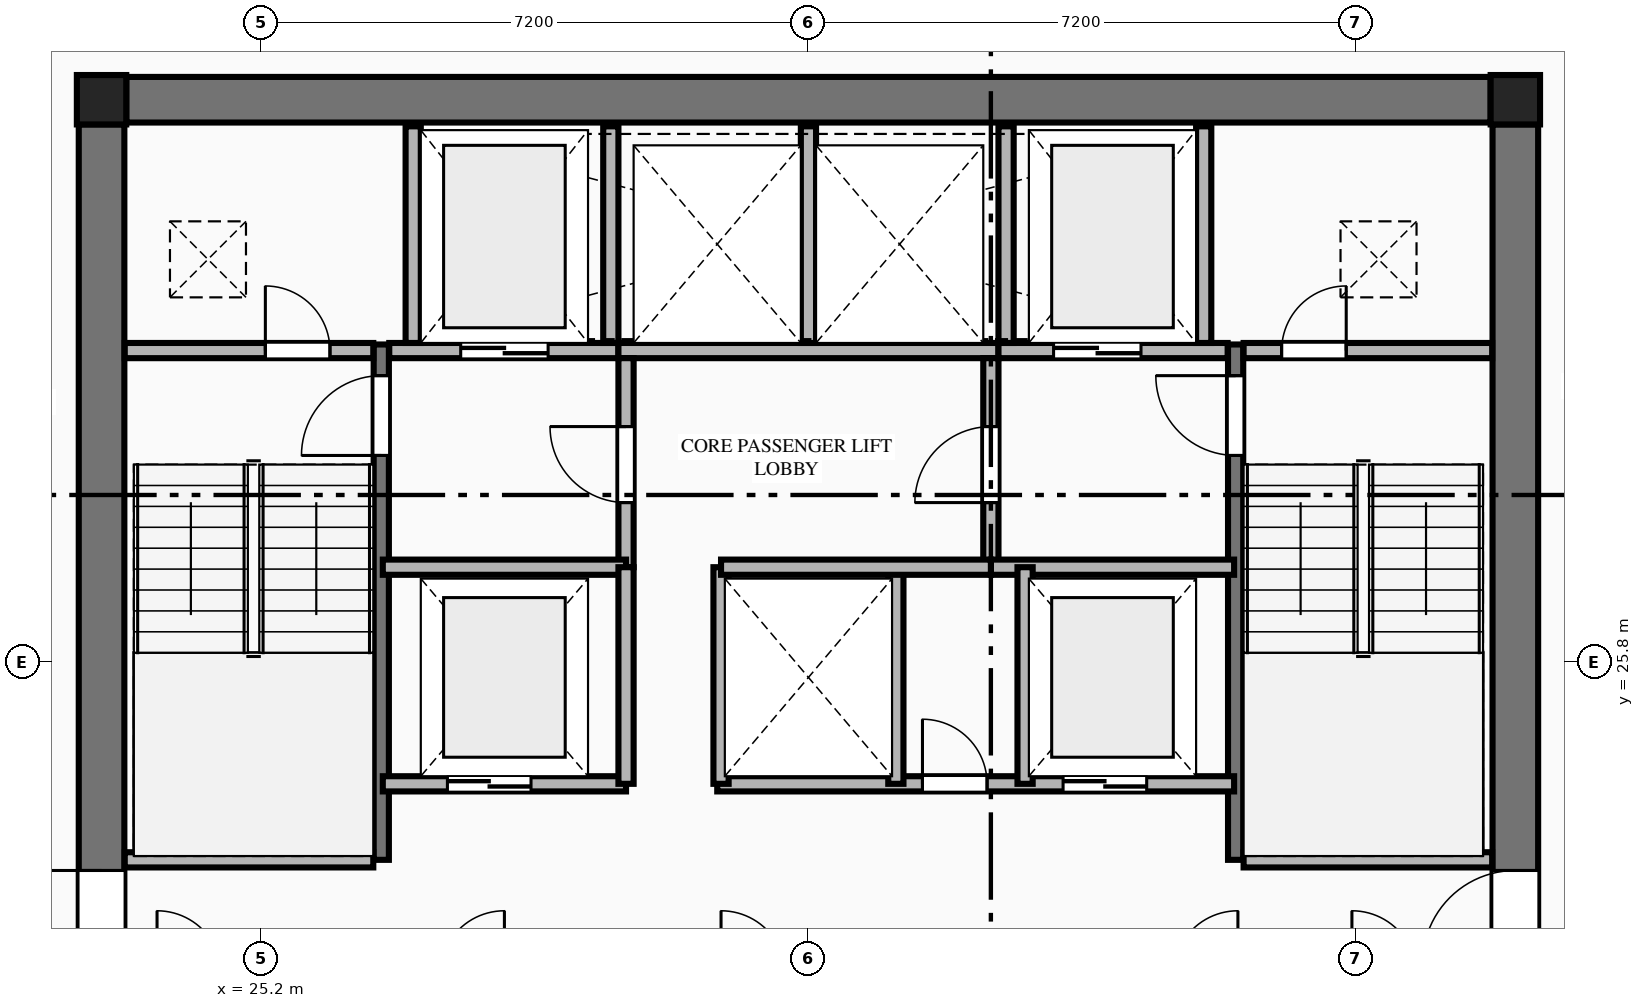
"""IFC4 building model, lengths in metres.
Left out: names, types, materials, properties, quantities, classifications, styles, units other than length and angle.
Written with IfcOpenShell. Run it as: python <this file> out.ifc"""

import sys

from ifc_helpers import new_model, si_unit, direction, frame, frame_2d, origin, origin_2d, place, context, subcontext, project, spatial, rectangle, extrude, element, fill, save


model = new_model("IFC4")
c1 = context("Model", 3, precision=1e-05, world=origin(), true_north=direction((0.0, 1.0)))
c2 = subcontext(c1, "Body", "Model", "MODEL_VIEW")
j1 = project(units=[si_unit("LENGTHUNIT", "METRE"), si_unit("PLANEANGLEUNIT", "RADIAN")], contexts=[c1])
p1 = place(None, origin())
s1 = spatial("IfcSite", under=j1, at=p1, CompositionType="ELEMENT")
p2 = place(p1, origin())
s2 = spatial("IfcBuilding", under=s1, at=p2, CompositionType="ELEMENT")
p3 = place(p2, frame((0.0, 0.0, 153.5)))
s3 = spatial("IfcBuildingStorey", under=s2, at=p3, CompositionType="ELEMENT", Elevation=153.5)
for number, where, z_axis, x_axis in (
    (1, (41.7, 33.2, 0.0), (0.0, 0.0, 1.0), (1.0, 0.0, 0.0)),
    (2, (23.1, 33.2, 0.0), (0.0, 0.0, 1.0), (1.0, 0.0, 0.0)),
):
    element("IfcColumn", number, at=place(p3, frame(where, z_axis=z_axis, x_axis=x_axis)), inside=s3, PredefinedType="COLUMN", context=c2, shape_type="SweptSolid", body=[
        extrude(rectangle(XDim=0.65, YDim=0.65, at=origin_2d()), origin(), (0.0, 0.0, 1.0), 3.55),
    ])
p4 = place(p3, frame((23.425, 33.2, 0.0), z_axis=(0.0, 0.0, 1.0), x_axis=(1.0, 0.0, 0.0)))
e3 = element("IfcWall", 3, at=p4, inside=s3, PredefinedType="SHEAR", context=c2, shape_type="SweptSolid", body=[
    extrude(rectangle(XDim=17.95, YDim=0.6, at=frame_2d((8.975, 0.0))), origin(), (0.0, 0.0, 1.0), 3.34),
])
p5 = place(p3, frame((23.1, 18.925, 0.0), z_axis=(0.0, 0.0, 1.0), x_axis=(0.0, 1.0, 0.0)))
e4 = element("IfcWall", 4, at=p5, inside=s3, PredefinedType="SHEAR", context=c2, shape_type="SweptSolid", body=[
    extrude(rectangle(XDim=13.95, YDim=0.6, at=frame_2d((6.975, 0.0))), origin(), (0.0, 0.0, 1.0), 3.34),
])
p6 = place(p5, frame((2.915, 0.0, 0.0)))
e5 = element("IfcOpeningElement", 5, at=p6, cuts=e4, PredefinedType="OPENING", context=c2, shape_type="SweptSolid", body=[
    extrude(rectangle(XDim=1.22, YDim=2.25, at=frame_2d((0.61, 1.125))), frame((0.0, 0.31, 0.0), z_axis=(0.0, -1.0, 0.0), x_axis=(1.0, 0.0, 0.0)), (0.0, 0.0, 1.0), 0.62),
])
p7 = place(p3, frame((41.7, 18.925, 0.0), z_axis=(0.0, 0.0, 1.0), x_axis=(0.0, 1.0, 0.0)))
e6 = element("IfcWall", 6, at=p7, inside=s3, PredefinedType="SHEAR", context=c2, shape_type="SweptSolid", body=[
    extrude(rectangle(XDim=13.95, YDim=0.6, at=frame_2d((6.975, 0.0))), origin(), (0.0, 0.0, 1.0), 3.34),
])
p8 = place(p7, frame((2.915, 0.0, 0.0)))
e7 = element("IfcOpeningElement", 7, at=p8, cuts=e6, PredefinedType="OPENING", context=c2, shape_type="SweptSolid", body=[
    extrude(rectangle(XDim=1.22, YDim=2.25, at=frame_2d((0.61, 1.125))), frame((0.0, 0.31, 0.0), z_axis=(0.0, -1.0, 0.0), x_axis=(1.0, 0.0, 0.0)), (0.0, 0.0, 1.0), 0.62),
])
p9 = place(p3, frame((26.78, 23.2, 0.0), z_axis=(0.0, 0.0, 1.0), x_axis=(0.0, 1.0, 0.0)))
e8 = element("IfcWall", 8, at=p9, inside=s3, PredefinedType="SHEAR", context=c2, shape_type="SweptSolid", body=[
    extrude(rectangle(XDim=6.78, YDim=0.2, at=frame_2d((3.39, 0.0))), origin(), (0.0, 0.0, 1.0), 3.55),
])
p10 = place(p9, frame((5.32, 0.0, 0.0)))
e9 = element("IfcOpeningElement", 9, at=p10, cuts=e8, PredefinedType="OPENING", context=c2, shape_type="SweptSolid", body=[
    extrude(rectangle(XDim=1.05, YDim=2.15, at=frame_2d((0.525, 1.075))), frame((0.0, 0.11, 0.0), z_axis=(0.0, -1.0, 0.0), x_axis=(1.0, 0.0, 0.0)), (0.0, 0.0, 1.0), 0.22),
])
p11 = place(p3, frame((23.405, 23.2, 0.0), z_axis=(0.0, 0.0, 1.0), x_axis=(1.0, 0.0, 0.0)))
e10 = element("IfcWall", 10, at=p11, inside=s3, PredefinedType="PLUMBINGWALL", context=c2, shape_type="SweptSolid", body=[
    extrude(rectangle(XDim=3.27, YDim=0.2, at=frame_2d((1.635, 0.0))), origin(), (0.0, 0.0, 1.0), 3.34),
])
p12 = place(p3, frame((38.02, 23.2, 0.0), z_axis=(0.0, 0.0, 1.0), x_axis=(0.0, 1.0, 0.0)))
e11 = element("IfcWall", 11, at=p12, inside=s3, PredefinedType="SHEAR", context=c2, shape_type="SweptSolid", body=[
    extrude(rectangle(XDim=6.78, YDim=0.2, at=frame_2d((3.39, 0.0))), origin(), (0.0, 0.0, 1.0), 3.55),
])
p13 = place(p12, frame((5.32, 0.0, 0.0)))
e12 = element("IfcOpeningElement", 12, at=p13, cuts=e11, PredefinedType="OPENING", context=c2, shape_type="SweptSolid", body=[
    extrude(rectangle(XDim=1.05, YDim=2.15, at=frame_2d((0.525, 1.075))), frame((0.0, 0.11, 0.0), z_axis=(0.0, -1.0, 0.0), x_axis=(1.0, 0.0, 0.0)), (0.0, 0.0, 1.0), 0.22),
])
p14 = place(p3, frame((38.125, 23.2, 0.0), z_axis=(0.0, 0.0, 1.0), x_axis=(1.0, 0.0, 0.0)))
e13 = element("IfcWall", 13, at=p14, inside=s3, PredefinedType="PLUMBINGWALL", context=c2, shape_type="SweptSolid", body=[
    extrude(rectangle(XDim=3.27, YDim=0.2, at=frame_2d((1.635, 0.0))), origin(), (0.0, 0.0, 1.0), 3.34),
])
p15 = place(p3, frame((23.405, 29.9, 0.0), z_axis=(0.0, 0.0, 1.0), x_axis=(1.0, 0.0, 0.0)))
e14 = element("IfcWall", 14, at=p15, inside=s3, PredefinedType="PLUMBINGWALL", context=c2, shape_type="SweptSolid", body=[
    extrude(rectangle(XDim=3.27, YDim=0.2, at=frame_2d((1.635, 0.0))), origin(), (0.0, 0.0, 1.0), 3.34),
])
p16 = place(p15, frame((1.85, 0.0, 0.0)))
e15 = element("IfcOpeningElement", 15, at=p16, cuts=e14, PredefinedType="OPENING", context=c2, shape_type="SweptSolid", body=[
    extrude(rectangle(XDim=0.85, YDim=2.05, at=frame_2d((0.425, 1.025))), frame((0.0, 0.11, 0.0), z_axis=(0.0, -1.0, 0.0), x_axis=(1.0, 0.0, 0.0)), (0.0, 0.0, 1.0), 0.22),
])
p17 = place(p3, frame((26.885, 29.9, 0.0), z_axis=(0.0, 0.0, 1.0), x_axis=(1.0, 0.0, 0.0)))
e16 = element("IfcWall", 16, at=p17, inside=s3, PredefinedType="PLUMBINGWALL", context=c2, shape_type="SweptSolid", body=[
    extrude(rectangle(XDim=3.015, YDim=0.2, at=frame_2d((1.507, 0.0))), origin(), (0.0, 0.0, 1.0), 3.34),
])
p18 = place(p17, frame((0.94, 0.0, 0.0)))
e17 = element("IfcOpeningElement", 17, at=p18, cuts=e16, PredefinedType="OPENING", context=c2, shape_type="SweptSolid", body=[
    extrude(rectangle(XDim=1.15, YDim=2.2, at=frame_2d((0.575, 1.1))), frame((0.0, 0.11, 0.0), z_axis=(0.0, -1.0, 0.0), x_axis=(1.0, 0.0, 0.0)), (0.0, 0.0, 1.0), 0.22),
])
p19 = place(p3, frame((29.9, 29.9, 0.0), z_axis=(0.0, 0.0, 1.0), x_axis=(1.0, 0.0, 0.0)))
e18 = element("IfcWall", 18, at=p19, inside=s3, PredefinedType="PLUMBINGWALL", context=c2, shape_type="SweptSolid", body=[
    extrude(rectangle(XDim=5.0, YDim=0.2, at=frame_2d((2.5, 0.0))), origin(), (0.0, 0.0, 1.0), 3.34),
])
p20 = place(p3, frame((34.9, 29.9, 0.0), z_axis=(0.0, 0.0, 1.0), x_axis=(1.0, 0.0, 0.0)))
e19 = element("IfcWall", 19, at=p20, inside=s3, PredefinedType="PLUMBINGWALL", context=c2, shape_type="SweptSolid", body=[
    extrude(rectangle(XDim=3.015, YDim=0.2, at=frame_2d((1.508, 0.0))), origin(), (0.0, 0.0, 1.0), 3.34),
])
p21 = place(p20, frame((0.725, 0.0, 0.0)))
e20 = element("IfcOpeningElement", 20, at=p21, cuts=e19, PredefinedType="OPENING", context=c2, shape_type="SweptSolid", body=[
    extrude(rectangle(XDim=1.15, YDim=2.2, at=frame_2d((0.575, 1.1))), frame((0.0, 0.11, 0.0), z_axis=(0.0, -1.0, 0.0), x_axis=(1.0, 0.0, 0.0)), (0.0, 0.0, 1.0), 0.22),
])
p22 = place(p3, frame((38.125, 29.9, 0.0), z_axis=(0.0, 0.0, 1.0), x_axis=(1.0, 0.0, 0.0)))
e21 = element("IfcWall", 21, at=p22, inside=s3, PredefinedType="PLUMBINGWALL", context=c2, shape_type="SweptSolid", body=[
    extrude(rectangle(XDim=3.27, YDim=0.2, at=frame_2d((1.635, 0.0))), origin(), (0.0, 0.0, 1.0), 3.34),
])
p23 = place(p22, frame((0.5, 0.0, 0.0)))
e22 = element("IfcOpeningElement", 22, at=p23, cuts=e21, PredefinedType="OPENING", context=c2, shape_type="SweptSolid", body=[
    extrude(rectangle(XDim=0.85, YDim=2.05, at=frame_2d((0.425, 1.025))), frame((0.0, 0.11, 0.0), z_axis=(0.0, -1.0, 0.0), x_axis=(1.0, 0.0, 0.0)), (0.0, 0.0, 1.0), 0.22),
])
for number, where, z_axis, x_axis in (
    (23, (27.2, 30.0, 0.0), (0.0, 0.0, 1.0), (0.0, 1.0, 0.0)),
    (24, (29.8, 30.0, 0.0), (0.0, 0.0, 1.0), (0.0, 1.0, 0.0)),
    (25, (32.4, 30.0, 0.0), (0.0, 0.0, 1.0), (0.0, 1.0, 0.0)),
    (26, (35.0, 30.0, 0.0), (0.0, 0.0, 1.0), (0.0, 1.0, 0.0)),
    (27, (37.6, 30.0, 0.0), (0.0, 0.0, 1.0), (0.0, 1.0, 0.0)),
):
    element("IfcWall", number, at=place(p3, frame(where, z_axis=z_axis, x_axis=x_axis)), inside=s3, PredefinedType="PLUMBINGWALL", context=c2, shape_type="SweptSolid", body=[
        extrude(rectangle(XDim=2.85, YDim=0.2, at=frame_2d((1.425, 0.0))), origin(), (0.0, 0.0, 1.0), 3.34),
    ])
p24 = place(p3, frame((30.0, 27.05, 0.0), z_axis=(0.0, 0.0, 1.0), x_axis=(0.0, 1.0, 0.0)))
e28 = element("IfcWall", 28, at=p24, inside=s3, PredefinedType="PLUMBINGWALL", context=c2, shape_type="SweptSolid", body=[
    extrude(rectangle(XDim=2.75, YDim=0.2, at=frame_2d((1.375, 0.0))), origin(), (0.0, 0.0, 1.0), 3.34),
])
p25 = place(p24, frame((0.85, 0.0, 0.0)))
e29 = element("IfcOpeningElement", 29, at=p25, cuts=e28, PredefinedType="OPENING", context=c2, shape_type="SweptSolid", body=[
    extrude(rectangle(XDim=1.0, YDim=2.15, at=frame_2d((0.5, 1.075))), frame((0.0, 0.11, 0.0), z_axis=(0.0, -1.0, 0.0), x_axis=(1.0, 0.0, 0.0)), (0.0, 0.0, 1.0), 0.22),
])
p26 = place(p3, frame((26.8, 27.05, 0.0), z_axis=(0.0, 0.0, 1.0), x_axis=(1.0, 0.0, 0.0)))
e30 = element("IfcWall", 30, at=p26, inside=s3, PredefinedType="PLUMBINGWALL", context=c2, shape_type="SweptSolid", body=[
    extrude(rectangle(XDim=3.2, YDim=0.2, at=frame_2d((1.6, 0.0))), origin(), (0.0, 0.0, 1.0), 3.34),
])
p27 = place(p3, frame((34.8, 27.05, 0.0), z_axis=(0.0, 0.0, 1.0), x_axis=(0.0, 1.0, 0.0)))
e31 = element("IfcWall", 31, at=p27, inside=s3, PredefinedType="PLUMBINGWALL", context=c2, shape_type="SweptSolid", body=[
    extrude(rectangle(XDim=2.75, YDim=0.2, at=frame_2d((1.375, 0.0))), origin(), (0.0, 0.0, 1.0), 3.34),
])
p28 = place(p27, frame((0.85, 0.0, 0.0)))
e32 = element("IfcOpeningElement", 32, at=p28, cuts=e31, PredefinedType="OPENING", context=c2, shape_type="SweptSolid", body=[
    extrude(rectangle(XDim=1.0, YDim=2.15, at=frame_2d((0.5, 1.075))), frame((0.0, 0.11, 0.0), z_axis=(0.0, -1.0, 0.0), x_axis=(1.0, 0.0, 0.0)), (0.0, 0.0, 1.0), 0.22),
])
p29 = place(p3, frame((34.8, 27.05, 0.0), z_axis=(0.0, 0.0, 1.0), x_axis=(1.0, 0.0, 0.0)))
e33 = element("IfcWall", 33, at=p29, inside=s3, PredefinedType="PLUMBINGWALL", context=c2, shape_type="SweptSolid", body=[
    extrude(rectangle(XDim=3.2, YDim=0.2, at=frame_2d((1.6, 0.0))), origin(), (0.0, 0.0, 1.0), 3.34),
])
p30 = place(p3, frame((26.8, 24.2, 0.0), z_axis=(0.0, 0.0, 1.0), x_axis=(1.0, 0.0, 0.0)))
e34 = element("IfcWall", 34, at=p30, inside=s3, PredefinedType="PLUMBINGWALL", context=c2, shape_type="SweptSolid", body=[
    extrude(rectangle(XDim=3.2, YDim=0.2, at=frame_2d((1.6, 0.0))), origin(), (0.0, 0.0, 1.0), 3.34),
])
p31 = place(p30, frame((0.85, 0.0, 0.0)))
e35 = element("IfcOpeningElement", 35, at=p31, cuts=e34, PredefinedType="OPENING", context=c2, shape_type="SweptSolid", body=[
    extrude(rectangle(XDim=1.1, YDim=2.2, at=frame_2d((0.55, 1.1))), frame((0.0, 0.11, 0.0), z_axis=(0.0, -1.0, 0.0), x_axis=(1.0, 0.0, 0.0)), (0.0, 0.0, 1.0), 0.22),
])
p32 = place(p3, frame((30.0, 24.2, 0.0), z_axis=(0.0, 0.0, 1.0), x_axis=(0.0, 1.0, 0.0)))
e36 = element("IfcWall", 36, at=p32, inside=s3, PredefinedType="PLUMBINGWALL", context=c2, shape_type="SweptSolid", body=[
    extrude(rectangle(XDim=2.85, YDim=0.2, at=frame_2d((1.425, 0.0))), origin(), (0.0, 0.0, 1.0), 3.34),
])
p33 = place(p3, frame((31.2, 24.2, 0.0), z_axis=(0.0, 0.0, 1.0), x_axis=(1.0, 0.0, 0.0)))
e37 = element("IfcWall", 37, at=p33, inside=s3, PredefinedType="PLUMBINGWALL", context=c2, shape_type="SweptSolid", body=[
    extrude(rectangle(XDim=6.8, YDim=0.2, at=frame_2d((3.4, 0.0))), origin(), (0.0, 0.0, 1.0), 3.34),
])
p34 = place(p33, frame((2.7, 0.0, 0.0)))
e38 = element("IfcOpeningElement", 38, at=p34, cuts=e37, PredefinedType="OPENING", context=c2, shape_type="SweptSolid", body=[
    extrude(rectangle(XDim=0.85, YDim=2.05, at=frame_2d((0.425, 1.025))), frame((0.0, 0.11, 0.0), z_axis=(0.0, -1.0, 0.0), x_axis=(1.0, 0.0, 0.0)), (0.0, 0.0, 1.0), 0.22),
])
p35 = place(p33, frame((4.55, 0.0, 0.0)))
e39 = element("IfcOpeningElement", 39, at=p35, cuts=e37, PredefinedType="OPENING", context=c2, shape_type="SweptSolid", body=[
    extrude(rectangle(XDim=1.1, YDim=2.2, at=frame_2d((0.55, 1.1))), frame((0.0, 0.11, 0.0), z_axis=(0.0, -1.0, 0.0), x_axis=(1.0, 0.0, 0.0)), (0.0, 0.0, 1.0), 0.22),
])
for number, where, z_axis, x_axis in (
    (40, (31.25, 24.2, 0.0), (0.0, 0.0, 1.0), (0.0, 1.0, 0.0)),
    (41, (33.55, 24.2, 0.0), (0.0, 0.0, 1.0), (0.0, 1.0, 0.0)),
    (42, (35.25, 24.2, 0.0), (0.0, 0.0, 1.0), (0.0, 1.0, 0.0)),
):
    element("IfcWall", number, at=place(p3, frame(where, z_axis=z_axis, x_axis=x_axis)), inside=s3, PredefinedType="PLUMBINGWALL", context=c2, shape_type="SweptSolid", body=[
        extrude(rectangle(XDim=2.85, YDim=0.2, at=frame_2d((1.425, 0.0))), origin(), (0.0, 0.0, 1.0), 3.34),
    ])
p36 = place(p3, frame((31.25, 27.05, 0.0), z_axis=(0.0, 0.0, 1.0), x_axis=(1.0, 0.0, 0.0)))
e43 = element("IfcWall", 43, at=p36, inside=s3, PredefinedType="PLUMBINGWALL", context=c2, shape_type="SweptSolid", body=[
    extrude(rectangle(XDim=3.55, YDim=0.2, at=frame_2d((1.775, 0.0))), origin(), (0.0, 0.0, 1.0), 3.34),
])
p37 = place(p6, origin())
e44 = element("IfcDoor", 44, at=p37, inside=s3, OperationType="SINGLE_SWING_RIGHT", PredefinedType="DOOR", context=c2, shape_type="SweptSolid", body=[
    extrude(rectangle(XDim=1.22, YDim=2.25, at=frame_2d((0.61, 1.125))), frame((0.0, 0.025, 0.0), z_axis=(0.0, -1.0, 0.0), x_axis=(1.0, 0.0, 0.0)), (0.0, 0.0, 1.0), 0.05),
])
fill(e5, e44)
p38 = place(p8, origin())
e45 = element("IfcDoor", 45, at=p38, inside=s3, OperationType="SINGLE_SWING_LEFT", PredefinedType="DOOR", context=c2, shape_type="SweptSolid", body=[
    extrude(rectangle(XDim=1.22, YDim=2.25, at=frame_2d((0.61, 1.125))), frame((0.0, 0.025, 0.0), z_axis=(0.0, -1.0, 0.0), x_axis=(1.0, 0.0, 0.0)), (0.0, 0.0, 1.0), 0.05),
])
fill(e7, e45)
p39 = place(p10, origin())
e46 = element("IfcDoor", 46, at=p39, inside=s3, OperationType="SINGLE_SWING_LEFT", PredefinedType="DOOR", context=c2, shape_type="SweptSolid", body=[
    extrude(rectangle(XDim=1.05, YDim=2.15, at=frame_2d((0.525, 1.075))), frame((0.0, 0.025, 0.0), z_axis=(0.0, -1.0, 0.0), x_axis=(1.0, 0.0, 0.0)), (0.0, 0.0, 1.0), 0.05),
])
fill(e9, e46)
p40 = place(p13, origin())
e47 = element("IfcDoor", 47, at=p40, inside=s3, OperationType="SINGLE_SWING_RIGHT", PredefinedType="DOOR", context=c2, shape_type="SweptSolid", body=[
    extrude(rectangle(XDim=1.05, YDim=2.15, at=frame_2d((0.525, 1.075))), frame((0.0, 0.025, 0.0), z_axis=(0.0, -1.0, 0.0), x_axis=(1.0, 0.0, 0.0)), (0.0, 0.0, 1.0), 0.05),
])
fill(e12, e47)
p41 = place(p16, origin())
e48 = element("IfcDoor", 48, at=p41, inside=s3, OperationType="SINGLE_SWING_LEFT", PredefinedType="DOOR", context=c2, shape_type="SweptSolid", body=[
    extrude(rectangle(XDim=0.85, YDim=2.05, at=frame_2d((0.425, 1.025))), frame((0.0, 0.025, 0.0), z_axis=(0.0, -1.0, 0.0), x_axis=(1.0, 0.0, 0.0)), (0.0, 0.0, 1.0), 0.05),
])
fill(e15, e48)
p42 = place(p23, origin())
e49 = element("IfcDoor", 49, at=p42, inside=s3, OperationType="SINGLE_SWING_RIGHT", PredefinedType="DOOR", context=c2, shape_type="SweptSolid", body=[
    extrude(rectangle(XDim=0.85, YDim=2.05, at=frame_2d((0.425, 1.025))), frame((0.0, 0.025, 0.0), z_axis=(0.0, -1.0, 0.0), x_axis=(1.0, 0.0, 0.0)), (0.0, 0.0, 1.0), 0.05),
])
fill(e22, e49)
p43 = place(p18, origin())
e50 = element("IfcDoor", 50, at=p43, inside=s3, OperationType="DOUBLE_DOOR_SLIDING", PredefinedType="DOOR", context=c2, shape_type="SweptSolid", body=[
    extrude(rectangle(XDim=1.15, YDim=2.2, at=frame_2d((0.575, 1.1))), frame((0.0, 0.025, 0.0), z_axis=(0.0, -1.0, 0.0), x_axis=(1.0, 0.0, 0.0)), (0.0, 0.0, 1.0), 0.05),
])
fill(e17, e50)
p44 = place(p21, origin())
e51 = element("IfcDoor", 51, at=p44, inside=s3, OperationType="DOUBLE_DOOR_SLIDING", PredefinedType="DOOR", context=c2, shape_type="SweptSolid", body=[
    extrude(rectangle(XDim=1.15, YDim=2.2, at=frame_2d((0.575, 1.1))), frame((0.0, 0.025, 0.0), z_axis=(0.0, -1.0, 0.0), x_axis=(1.0, 0.0, 0.0)), (0.0, 0.0, 1.0), 0.05),
])
fill(e20, e51)
p45 = place(p25, origin())
e52 = element("IfcDoor", 52, at=p45, inside=s3, OperationType="SINGLE_SWING_RIGHT", PredefinedType="DOOR", context=c2, shape_type="SweptSolid", body=[
    extrude(rectangle(XDim=1.0, YDim=2.15, at=frame_2d((0.5, 1.075))), frame((0.0, 0.025, 0.0), z_axis=(0.0, -1.0, 0.0), x_axis=(1.0, 0.0, 0.0)), (0.0, 0.0, 1.0), 0.05),
])
fill(e29, e52)
p46 = place(p28, origin())
e53 = element("IfcDoor", 53, at=p46, inside=s3, OperationType="SINGLE_SWING_LEFT", PredefinedType="DOOR", context=c2, shape_type="SweptSolid", body=[
    extrude(rectangle(XDim=1.0, YDim=2.15, at=frame_2d((0.5, 1.075))), frame((0.0, 0.025, 0.0), z_axis=(0.0, -1.0, 0.0), x_axis=(1.0, 0.0, 0.0)), (0.0, 0.0, 1.0), 0.05),
])
fill(e32, e53)
p47 = place(p31, origin())
e54 = element("IfcDoor", 54, at=p47, inside=s3, OperationType="DOUBLE_DOOR_SLIDING", PredefinedType="DOOR", context=c2, shape_type="SweptSolid", body=[
    extrude(rectangle(XDim=1.1, YDim=2.2, at=frame_2d((0.55, 1.1))), frame((0.0, 0.025, 0.0), z_axis=(0.0, -1.0, 0.0), x_axis=(1.0, 0.0, 0.0)), (0.0, 0.0, 1.0), 0.05),
])
fill(e35, e54)
p48 = place(p34, origin())
e55 = element("IfcDoor", 55, at=p48, inside=s3, OperationType="SINGLE_SWING_LEFT", PredefinedType="DOOR", context=c2, shape_type="SweptSolid", body=[
    extrude(rectangle(XDim=0.85, YDim=2.05, at=frame_2d((0.425, 1.025))), frame((0.0, 0.025, 0.0), z_axis=(0.0, -1.0, 0.0), x_axis=(1.0, 0.0, 0.0)), (0.0, 0.0, 1.0), 0.05),
])
fill(e38, e55)
p49 = place(p35, origin())
e56 = element("IfcDoor", 56, at=p49, inside=s3, OperationType="DOUBLE_DOOR_SLIDING", PredefinedType="DOOR", context=c2, shape_type="SweptSolid", body=[
    extrude(rectangle(XDim=1.1, YDim=2.2, at=frame_2d((0.55, 1.1))), frame((0.0, 0.025, 0.0), z_axis=(0.0, -1.0, 0.0), x_axis=(1.0, 0.0, 0.0)), (0.0, 0.0, 1.0), 0.05),
])
fill(e39, e56)
save(model, sys.argv[1])
